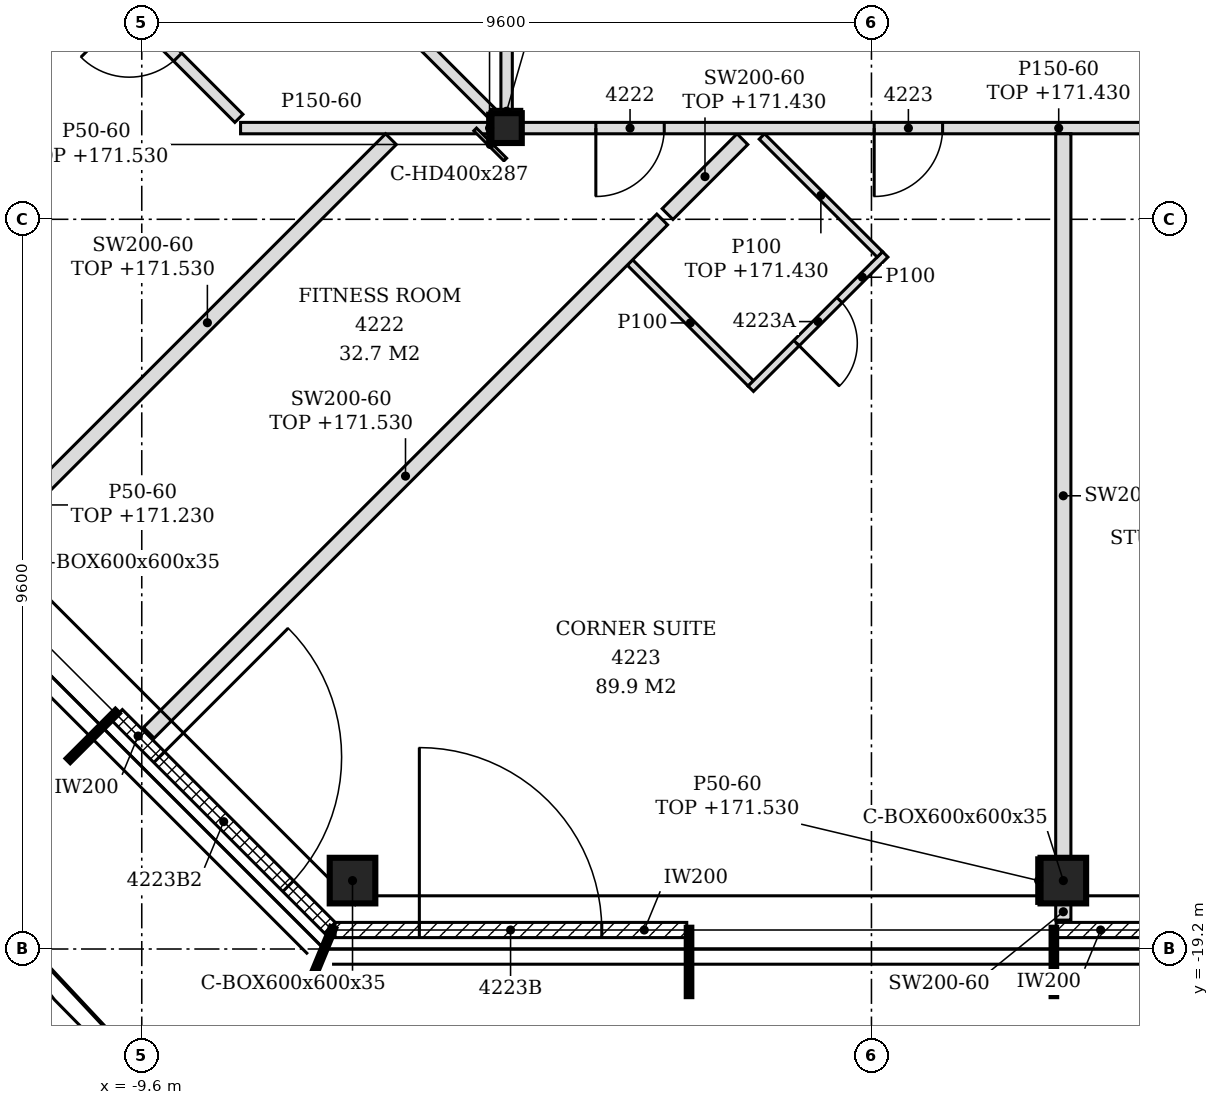
"""IFC4 building model, lengths in metres.
Left out: names, types, materials, properties, quantities, classifications, styles, units other than length and angle.
Written with IfcOpenShell. Run it as: python <this file> out.ifc"""

import sys

from ifc_helpers import new_model, si_unit, direction, frame, frame_2d, origin, origin_2d, place, context, subcontext, project, spatial, polyline, rectangle, hollow_rectangle, i_section, outline, extrude, clip, halfspace, element, fill, save


model = new_model("IFC4")
c1 = context("Model", 3, precision=1e-05, world=origin(), true_north=direction((0.0, 1.0)))
c2 = subcontext(c1, "Body", "Model", "MODEL_VIEW")
j1 = project(units=[si_unit("LENGTHUNIT", "METRE"), si_unit("PLANEANGLEUNIT", "RADIAN")], contexts=[c1])
p1 = place(None, origin())
s1 = spatial("IfcSite", under=j1, at=p1, CompositionType="ELEMENT")
p2 = place(p1, origin())
s2 = spatial("IfcBuilding", under=s1, at=p2, CompositionType="ELEMENT")
p3 = place(p2, frame((0.0, 0.0, 168.6)))
s3 = spatial("IfcBuildingStorey", under=s2, at=p3, CompositionType="ELEMENT", Elevation=168.6)
for number, where, z_axis, x_axis in (
    (1, (-6.827, -18.3, -0.15), (0.0, 0.0, 1.0), (1.0, 0.0, 0.0)),
    (2, (2.524, -18.3, -0.15), (0.0, 0.0, 1.0), (1.0, 0.0, 0.0)),
):
    element("IfcColumn", number, at=place(p3, frame(where, z_axis=z_axis, x_axis=x_axis)), inside=s3, PredefinedType="COLUMN", context=c2, shape_type="Clipping", body=[
        clip(extrude(hollow_rectangle(XDim=0.6, YDim=0.6, WallThickness=0.035, at=origin_2d()), origin(), (0.0, 0.0, 1.0), 3.6), halfspace(frame((0.0, 0.0, 3.589), z_axis=(0.0, 0.0, 1.0), x_axis=(1.0, 0.0, 0.0)), False)),
    ])
p4 = place(p3, frame((-4.8, -8.4, -0.15), z_axis=(0.0, 0.0, 1.0), x_axis=(1.0, 0.0, 0.0)))
e3 = element("IfcColumn", 3, at=p4, inside=s3, PredefinedType="COLUMN", context=c2, shape_type="SweptSolid", body=[
    extrude(i_section(OverallWidth=0.399, OverallDepth=0.393, WebThickness=0.023, FlangeThickness=0.037, FilletRadius=0.015, at=origin_2d()), origin(), (0.0, 0.0, 1.0), 3.6),
])
p5 = place(p3, frame((-7.056, -18.95, 0.0), z_axis=(0.0, 0.0, 1.0), x_axis=(1.0, 0.0, 0.0)))
e4 = element("IfcWall", 4, at=p5, inside=s3, PredefinedType="NOTDEFINED", context=c2, shape_type="SweptSolid", body=[
    extrude(rectangle(XDim=4.626, YDim=0.2, at=frame_2d((2.313, 0.0))), origin(), (0.0, 0.0, 1.0), 3.45),
])
p6 = place(p5, frame((1.108, 0.0, 0.0)))
e5 = element("IfcOpeningElement", 5, at=p6, cuts=e4, PredefinedType="OPENING", context=c2, shape_type="SweptSolid", body=[
    extrude(rectangle(XDim=2.4, YDim=2.4, at=frame_2d((1.2, 1.2))), frame((0.0, 0.11, 0.0), z_axis=(0.0, -1.0, 0.0), x_axis=(1.0, 0.0, 0.0)), (0.0, 0.0, 1.0), 0.22),
])
p7 = place(p3, frame((2.43, -18.95, 0.0), z_axis=(0.0, 0.0, 1.0), x_axis=(1.0, 0.0, 0.0)))
e6 = element("IfcWall", 6, at=p7, inside=s3, PredefinedType="NOTDEFINED", context=c2, shape_type="SweptSolid", body=[
    extrude(rectangle(XDim=4.74, YDim=0.2, at=frame_2d((2.37, 0.0))), origin(), (0.0, 0.0, 1.0), 3.45),
])
p8 = place(p7, frame((1.17, 0.0, 0.0)))
e7 = element("IfcOpeningElement", 7, at=p8, cuts=e6, PredefinedType="OPENING", context=c2, shape_type="SweptSolid", body=[
    extrude(rectangle(XDim=2.4, YDim=2.4, at=frame_2d((1.2, 1.2))), frame((0.0, 0.11, 0.0), z_axis=(0.0, -1.0, 0.0), x_axis=(1.0, 0.0, 0.0)), (0.0, 0.0, 1.0), 0.22),
])
p9 = place(p3, frame((-9.926, -16.121, 0.0), z_axis=(0.0, 0.0, 1.0), x_axis=(0.707137595296, -0.707075965734, 0.0)))
e8 = element("IfcWall", 8, at=p9, inside=s3, PredefinedType="NOTDEFINED", context=c2, shape_type="SweptSolid", body=[
    extrude(rectangle(XDim=3.961, YDim=0.2, at=frame_2d((1.981, 0.0))), origin(), (0.0, 0.0, 1.0), 3.45),
])
p10 = place(p9, frame((0.785, 0.0, 0.0)))
e9 = element("IfcOpeningElement", 9, at=p10, cuts=e8, PredefinedType="OPENING", context=c2, shape_type="SweptSolid", body=[
    extrude(rectangle(XDim=2.4, YDim=2.4, at=frame_2d((1.2, 1.2))), frame((0.0, 0.11, 0.0), z_axis=(0.0, -1.0, 0.0), x_axis=(1.0, 0.0, 0.0)), (0.0, 0.0, 1.0), 0.22),
])
p11 = place(p3, frame((2.524, -18.82, 0.0), z_axis=(0.0, 0.0, 1.0), x_axis=(0.0, 1.0, 0.0)))
e10 = element("IfcWall", 10, at=p11, inside=s3, PredefinedType="PARTITIONING", context=c2, shape_type="SweptSolid", body=[
    extrude(rectangle(XDim=0.22, YDim=0.2, at=frame_2d((0.11, 0.0))), origin(), (0.0, 0.0, 1.0), 3.45),
])
p12 = place(p3, frame((2.524, -18.0, 0.0), z_axis=(0.0, 0.0, 1.0), x_axis=(0.0, 1.0, 0.0)))
e11 = element("IfcWall", 11, at=p12, inside=s3, PredefinedType="PARTITIONING", context=c2, shape_type="SweptSolid", body=[
    extrude(outline(polyline([(0.0, 0.0), (9.525, 0.0), (9.525, 2.83), (9.45, 2.83), (9.448, 3.45), (3.705, 3.45), (3.703, 2.88), (3.495, 2.88), (3.493, 3.45), (0.0, 3.45), (0.0, 0.0)])), frame((0.0, 0.1, 0.0), z_axis=(0.0, -1.0, 0.0), x_axis=(1.0, 0.0, 0.0)), (0.0, 0.0, 1.0), 0.2),
])
p13 = place(p3, frame((-9.507, -16.355, 0.0), z_axis=(0.0, 0.0, 1.0), x_axis=(0.707170680804, 0.707042875794, 0.0)))
e12 = element("IfcWall", 12, at=p13, inside=s3, PredefinedType="PARTITIONING", context=c2, shape_type="SweptSolid", body=[
    extrude(rectangle(XDim=9.551, YDim=0.2, at=frame_2d((4.776, 0.0))), origin(), (0.0, 0.0, 1.0), 2.93),
])
p14 = place(p3, frame((-11.152, -13.375, 0.0), z_axis=(0.0, 0.0, 1.0), x_axis=(0.707106781187, 0.707106781187, 0.0)))
e13 = element("IfcWall", 13, at=p14, inside=s3, PredefinedType="PARTITIONING", context=c2, shape_type="SweptSolid", body=[
    extrude(rectangle(XDim=6.83, YDim=0.2, at=frame_2d((3.415, 0.0))), origin(), (0.0, 0.0, 1.0), 2.93),
])
p15 = place(p3, frame((-1.587, -11.759, 0.0), z_axis=(0.0, 0.0, 1.0), x_axis=(-0.706889644159, 0.707323851557, 0.0)))
e14 = element("IfcWall", 14, at=p15, inside=s3, PredefinedType="PARTITIONING", context=c2, shape_type="SweptSolid", body=[
    extrude(rectangle(XDim=2.249, YDim=0.1, at=frame_2d((1.125, 0.0))), origin(), (0.0, 0.0, 1.0), 3.45),
])
p16 = place(p3, frame((-1.587, -11.829, 0.0), z_axis=(0.0, 0.0, 1.0), x_axis=(0.707350821469, 0.706862656651, 0.0)))
e15 = element("IfcWall", 15, at=p16, inside=s3, PredefinedType="PARTITIONING", context=c2, shape_type="SweptSolid", body=[
    extrude(rectangle(XDim=2.5, YDim=0.1, at=frame_2d((1.25, 0.0))), origin(), (0.0, 0.0, 1.0), 3.45),
])
p17 = place(p16, frame((0.85, 0.0, 0.0)))
e16 = element("IfcOpeningElement", 16, at=p17, cuts=e15, PredefinedType="OPENING", context=c2, shape_type="SweptSolid", body=[
    extrude(rectangle(XDim=0.8, YDim=2.1, at=frame_2d((0.4, 1.05))), frame((0.0, 0.06, 0.0), z_axis=(0.0, -1.0, 0.0), x_axis=(1.0, 0.0, 0.0)), (0.0, 0.0, 1.0), 0.12),
])
p18 = place(p3, frame((0.111, -10.062, 0.0), z_axis=(0.0, 0.0, 1.0), x_axis=(-0.70732924673, 0.706884245631, 0.0)))
e17 = element("IfcWall", 17, at=p18, inside=s3, PredefinedType="PARTITIONING", context=c2, shape_type="SweptSolid", body=[
    extrude(rectangle(XDim=2.195, YDim=0.1, at=frame_2d((1.097, 0.0))), origin(), (0.0, 0.0, 1.0), 2.83),
])
p19 = place(p3, frame((-2.683, -9.531, 0.0), z_axis=(0.0, 0.0, 1.0), x_axis=(0.707019164958, 0.70719438656, 0.0)))
e18 = element("IfcWall", 18, at=p19, inside=s3, PredefinedType="PARTITIONING", context=c2, shape_type="SweptSolid", body=[
    extrude(rectangle(XDim=1.393, YDim=0.2, at=frame_2d((0.697, 0.0))), origin(), (0.0, 0.0, 1.0), 2.83),
])
p20 = place(p3, frame((-14.202, -9.402, 0.0), z_axis=(0.0, 0.0, 1.0), x_axis=(0.707081776084, 0.707131785404, 0.0)))
e19 = element("IfcWall", 19, at=p20, inside=s3, PredefinedType="PARTITIONING", context=c2, shape_type="SweptSolid", body=[
    extrude(rectangle(XDim=4.882, YDim=0.2, at=frame_2d((2.441, 0.0))), origin(), (0.0, 0.0, 1.0), 2.93),
])
p21 = place(p3, frame((-8.3, -8.4, 0.0), z_axis=(0.0, 0.0, 1.0), x_axis=(1.0, 0.0, 0.0)))
e20 = element("IfcWall", 20, at=p21, inside=s3, PredefinedType="PARTITIONING", context=c2, shape_type="SweptSolid", body=[
    extrude(rectangle(XDim=3.301, YDim=0.15, at=frame_2d((1.65, 0.0))), origin(), (0.0, 0.0, 1.0), 3.45),
])
p22 = place(p3, frame((-4.601, -8.4, 0.0), z_axis=(0.0, 0.0, 1.0), x_axis=(1.0, 0.0, 0.0)))
e21 = element("IfcWall", 21, at=p22, inside=s3, PredefinedType="PARTITIONING", context=c2, shape_type="SweptSolid", body=[
    extrude(rectangle(XDim=11.601, YDim=0.15, at=frame_2d((5.801, 0.0))), origin(), (0.0, 0.0, 1.0), 2.83),
])
p23 = place(p22, frame((0.974, 0.0, 0.0)))
e22 = element("IfcOpeningElement", 22, at=p23, cuts=e21, PredefinedType="OPENING", context=c2, shape_type="SweptSolid", body=[
    extrude(rectangle(XDim=0.9, YDim=2.1, at=frame_2d((0.45, 1.05))), frame((0.0, 0.085, 0.0), z_axis=(0.0, -1.0, 0.0), x_axis=(1.0, 0.0, 0.0)), (0.0, 0.0, 1.0), 0.17),
])
p24 = place(p22, frame((4.636, 0.0, 0.0)))
e23 = element("IfcOpeningElement", 23, at=p24, cuts=e21, PredefinedType="OPENING", context=c2, shape_type="SweptSolid", body=[
    extrude(rectangle(XDim=0.9, YDim=2.1, at=frame_2d((0.45, 1.05))), frame((0.0, 0.085, 0.0), z_axis=(0.0, -1.0, 0.0), x_axis=(1.0, 0.0, 0.0)), (0.0, 0.0, 1.0), 0.17),
])
p25 = place(p22, frame((8.592, 0.0, 0.0)))
e24 = element("IfcOpeningElement", 24, at=p25, cuts=e21, PredefinedType="OPENING", context=c2, shape_type="SweptSolid", body=[
    extrude(rectangle(XDim=0.9, YDim=2.1, at=frame_2d((0.45, 1.05))), frame((0.0, 0.085, 0.0), z_axis=(0.0, -1.0, 0.0), x_axis=(1.0, 0.0, 0.0)), (0.0, 0.0, 1.0), 0.17),
])
p26 = place(p3, frame((-8.322, -8.272, 0.0), z_axis=(0.0, 0.0, 1.0), x_axis=(-0.707117118476, 0.707096443746, 0.0)))
e25 = element("IfcWall", 25, at=p26, inside=s3, PredefinedType="PARTITIONING", context=c2, shape_type="SweptSolid", body=[
    extrude(rectangle(XDim=11.809, YDim=0.15, at=frame_2d((5.904, 0.0))), origin(), (0.0, 0.0, 1.0), 2.93),
])
p27 = place(p26, frame((9.645, 0.0, 0.0)))
e26 = element("IfcOpeningElement", 26, at=p27, cuts=e25, PredefinedType="OPENING", context=c2, shape_type="SweptSolid", body=[
    extrude(rectangle(XDim=0.9, YDim=2.1, at=frame_2d((0.45, 1.05))), frame((0.0, 0.085, 0.0), z_axis=(0.0, -1.0, 0.0), x_axis=(1.0, 0.0, 0.0)), (0.0, 0.0, 1.0), 0.17),
])
p28 = place(p26, frame((5.33, 0.0, 0.0)))
e27 = element("IfcOpeningElement", 27, at=p28, cuts=e25, PredefinedType="OPENING", context=c2, shape_type="SweptSolid", body=[
    extrude(rectangle(XDim=0.9, YDim=2.1, at=frame_2d((0.45, 1.05))), frame((0.0, 0.085, 0.0), z_axis=(0.0, -1.0, 0.0), x_axis=(1.0, 0.0, 0.0)), (0.0, 0.0, 1.0), 0.17),
])
p29 = place(p26, frame((1.139, 0.0, 0.0)))
e28 = element("IfcOpeningElement", 28, at=p29, cuts=e25, PredefinedType="OPENING", context=c2, shape_type="SweptSolid", body=[
    extrude(rectangle(XDim=0.9, YDim=2.1, at=frame_2d((0.45, 1.05))), frame((0.0, 0.085, 0.0), z_axis=(0.0, -1.0, 0.0), x_axis=(1.0, 0.0, 0.0)), (0.0, 0.0, 1.0), 0.17),
])
p30 = place(p3, frame((-4.998, -8.202, 0.0), z_axis=(0.0, 0.0, 1.0), x_axis=(-0.707106781187, 0.707106781187, 0.0)))
e29 = element("IfcWall", 29, at=p30, inside=s3, PredefinedType="PARTITIONING", context=c2, shape_type="SweptSolid", body=[
    extrude(rectangle(XDim=6.327, YDim=0.15, at=frame_2d((3.164, 0.0))), origin(), (0.0, 0.0, 1.0), 2.93),
])
p31 = place(p30, frame((2.664, 0.0, 0.0)))
e30 = element("IfcOpeningElement", 30, at=p31, cuts=e29, PredefinedType="OPENING", context=c2, shape_type="SweptSolid", body=[
    extrude(rectangle(XDim=0.9, YDim=2.1, at=frame_2d((0.45, 1.05))), frame((0.0, 0.085, 0.0), z_axis=(0.0, -1.0, 0.0), x_axis=(1.0, 0.0, 0.0)), (0.0, 0.0, 1.0), 0.17),
])
p32 = place(p3, frame((-4.8, -8.204, 0.0), z_axis=(0.0, 0.0, 1.0), x_axis=(0.0, 1.0, 0.0)))
e31 = element("IfcWall", 31, at=p32, inside=s3, PredefinedType="PARTITIONING", context=c2, shape_type="SweptSolid", body=[
    extrude(rectangle(XDim=4.529, YDim=0.15, at=frame_2d((2.264, 0.0))), origin(), (0.0, 0.0, 1.0), 2.83),
])
p33 = place(p3, frame((2.199, -18.6, 0.0), z_axis=(0.0, 0.0, 1.0), x_axis=(0.0, 1.0, 0.0)))
e32 = element("IfcWall", 32, at=p33, inside=s3, PredefinedType="PARTITIONING", context=c2, shape_type="SweptSolid", body=[
    extrude(rectangle(XDim=0.6, YDim=0.05, at=frame_2d((0.3, 0.0))), origin(), (0.0, 0.0, 1.0), 2.93),
])
p34 = place(p3, frame((-5.0, -8.178, 0.0), z_axis=(0.0, 0.0, 1.0), x_axis=(1.0, 0.0, 0.0)))
e33 = element("IfcWall", 33, at=p34, inside=s3, PredefinedType="PARTITIONING", context=c2, shape_type="SweptSolid", body=[
    extrude(rectangle(XDim=0.399, YDim=0.05, at=frame_2d((0.199, 0.0))), origin(), (0.0, 0.0, 1.0), 2.83),
])
p35 = place(p3, frame((-4.818, -8.814, 0.0), z_axis=(0.0, 0.0, 1.0), x_axis=(-0.707106781187, 0.707106781187, 0.0)))
e34 = element("IfcWall", 34, at=p35, inside=s3, PredefinedType="PARTITIONING", context=c2, shape_type="SweptSolid", body=[
    extrude(rectangle(XDim=0.56, YDim=0.05, at=frame_2d((0.28, 0.0))), origin(), (0.0, 0.0, 1.0), 2.93),
])
p36 = place(p3, frame((-5.024, -8.596, 0.0), z_axis=(0.0, 0.0, 1.0), x_axis=(0.0, 1.0, 0.0)))
e35 = element("IfcWall", 35, at=p36, inside=s3, PredefinedType="PARTITIONING", context=c2, shape_type="SweptSolid", body=[
    extrude(rectangle(XDim=0.393, YDim=0.05, at=frame_2d((0.196, 0.0))), origin(), (0.0, 0.0, 1.0), 3.45),
])
p37 = place(p6, origin())
e36 = element("IfcDoor", 36, at=p37, inside=s3, OperationType="SINGLE_SWING_LEFT", PredefinedType="DOOR", context=c2, shape_type="SweptSolid", body=[
    extrude(rectangle(XDim=2.4, YDim=2.4, at=frame_2d((1.2, 1.2))), frame((0.0, 0.025, 0.0), z_axis=(0.0, -1.0, 0.0), x_axis=(1.0, 0.0, 0.0)), (0.0, 0.0, 1.0), 0.05),
])
fill(e5, e36)
p38 = place(p10, origin())
e37 = element("IfcDoor", 37, at=p38, inside=s3, OperationType="SINGLE_SWING_LEFT", PredefinedType="DOOR", context=c2, shape_type="SweptSolid", body=[
    extrude(rectangle(XDim=2.4, YDim=2.4, at=frame_2d((1.2, 1.2))), frame((0.0, 0.025, 0.0), z_axis=(0.0, -1.0, 0.0), x_axis=(1.0, 0.0, 0.0)), (0.0, 0.0, 1.0), 0.05),
])
fill(e9, e37)
p39 = place(p29, origin())
e38 = element("IfcDoor", 38, at=p39, inside=s3, OperationType="SINGLE_SWING_RIGHT", PredefinedType="DOOR", context=c2, shape_type="SweptSolid", body=[
    extrude(rectangle(XDim=0.9, YDim=2.1, at=frame_2d((0.45, 1.05))), frame((0.0, 0.025, 0.0), z_axis=(0.0, -1.0, 0.0), x_axis=(1.0, 0.0, 0.0)), (0.0, 0.0, 1.0), 0.05),
])
fill(e28, e38)
p40 = place(p23, frame((0.9, 0.0, 0.0), z_axis=(0.0, 0.0, 1.0), x_axis=(-1.0, 0.0, 0.0)))
e39 = element("IfcDoor", 39, at=p40, inside=s3, OperationType="SINGLE_SWING_RIGHT", PredefinedType="DOOR", context=c2, shape_type="SweptSolid", body=[
    extrude(rectangle(XDim=0.9, YDim=2.1, at=frame_2d((0.45, 1.05))), frame((0.0, 0.025, 0.0), z_axis=(0.0, -1.0, 0.0), x_axis=(1.0, 0.0, 0.0)), (0.0, 0.0, 1.0), 0.05),
])
fill(e22, e39)
p41 = place(p24, frame((0.9, 0.0, 0.0), z_axis=(0.0, 0.0, 1.0), x_axis=(-1.0, 0.0, 0.0)))
e40 = element("IfcDoor", 40, at=p41, inside=s3, OperationType="SINGLE_SWING_RIGHT", PredefinedType="DOOR", context=c2, shape_type="SweptSolid", body=[
    extrude(rectangle(XDim=0.9, YDim=2.1, at=frame_2d((0.45, 1.05))), frame((0.0, 0.025, 0.0), z_axis=(0.0, -1.0, 0.0), x_axis=(1.0, 0.0, 0.0)), (0.0, 0.0, 1.0), 0.05),
])
fill(e23, e40)
p42 = place(p17, frame((0.8, 0.0, 0.0), z_axis=(0.0, 0.0, 1.0), x_axis=(-1.0, 0.0, 0.0)))
e41 = element("IfcDoor", 41, at=p42, inside=s3, OperationType="SINGLE_SWING_RIGHT", PredefinedType="DOOR", context=c2, shape_type="SweptSolid", body=[
    extrude(rectangle(XDim=0.8, YDim=2.1, at=frame_2d((0.4, 1.05))), frame((0.0, 0.025, 0.0), z_axis=(0.0, -1.0, 0.0), x_axis=(1.0, 0.0, 0.0)), (0.0, 0.0, 1.0), 0.05),
])
fill(e16, e41)
save(model, sys.argv[1])
